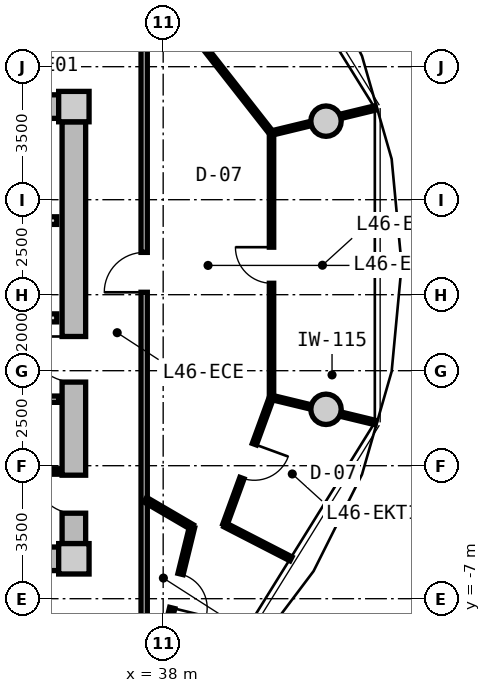
"""IFC4 building model, lengths in metres.
Left out: names, types, materials, properties, quantities, classifications, styles, units other than length and angle.
Written with IfcOpenShell. Run it as: python <this file> out.ifc"""

import sys

from ifc_helpers import new_model, si_unit, direction, frame, frame_2d, origin, origin_2d, place, context, subcontext, project, spatial, rectangle, circle, extrude, source, transform, mapped, element, fill, save


model = new_model("IFC4")
c1 = context("Model", 3, precision=1e-05, world=origin(), true_north=direction((0.0, 1.0)))
c2 = subcontext(c1, "Body", "Model", "MODEL_VIEW")
j1 = project(units=[si_unit("LENGTHUNIT", "METRE"), si_unit("PLANEANGLEUNIT", "RADIAN")], contexts=[c1])
p1 = place(None, origin())
s1 = spatial("IfcSite", under=j1, at=p1, CompositionType="ELEMENT")
p2 = place(p1, origin())
s2 = spatial("IfcBuilding", under=s1, at=p2, CompositionType="ELEMENT")
p3 = place(p2, frame((0.0, 0.0, 149.55)))
s3 = spatial("IfcBuildingStorey", under=s2, at=p3, CompositionType="ELEMENT", Elevation=149.55)
m1 = source(origin(), c2, "Body", "SweptSolid", [
    extrude(rectangle(XDim=0.8, YDim=0.8, at=origin_2d()), origin(), (0.0, 0.0, 1.0), 3.05),
])
for number, where, z_axis, x_axis in (
    (1, (35.65, -5.95, 0.0), (0.0, 0.0, 1.0), (1.0, 0.0, 0.0)),
    (2, (35.65, 5.95, 0.0), (0.0, 0.0, 1.0), (1.0, 0.0, 0.0)),
):
    element("IfcColumn", number, at=place(p3, frame(where, z_axis=z_axis, x_axis=x_axis)), inside=s3, PredefinedType="COLUMN", context=c2, shape_type="MappedRepresentation", body=[
        mapped(m1, transform((0.0, 0.0, 0.0), x_axis=(1.0, 0.0, 0.0), y_axis=(0.0, 1.0, 0.0), z_axis=(0.0, 0.0, 1.0), scale=1.0)),
    ])
m2 = source(origin(), c2, "Body", "SweptSolid", [
    extrude(rectangle(XDim=14.5, YDim=0.62, at=frame_2d((7.25, 0.0))), origin(), (0.0, 0.0, 1.0), 2.81),
])
for number, where, z_axis, x_axis in (
    (3, (20.75, 5.95, 0.0), (0.0, 0.0, 1.0), (1.0, 0.0, 0.0)),
    (4, (35.25, -5.95, 0.0), (0.0, 0.0, 1.0), (-1.0, 0.0, 0.0)),
):
    element("IfcWall", number, at=place(p3, frame(where, z_axis=z_axis, x_axis=x_axis)), inside=s3, PredefinedType="SHEAR", context=c2, shape_type="MappedRepresentation", body=[
        mapped(m2, transform((0.0, 0.0, 0.0), x_axis=(1.0, 0.0, 0.0), y_axis=(0.0, 1.0, 0.0), z_axis=(0.0, 0.0, 1.0), scale=1.0)),
    ])
m3 = source(origin(), c2, "Body", "SweptSolid", [
    extrude(rectangle(XDim=11.1, YDim=0.62, at=frame_2d((5.55, 0.0))), origin(), (0.0, 0.0, 1.0), 2.81),
])
p4 = place(p3, frame((35.65, 5.55, 0.0), z_axis=(0.0, 0.0, 1.0), x_axis=(0.0, -1.0, 0.0)))
e5 = element("IfcWall", 5, at=p4, inside=s3, PredefinedType="SHEAR", context=c2, shape_type="MappedRepresentation", body=[
    mapped(m3, transform((0.0, 0.0, 0.0), x_axis=(1.0, 0.0, 0.0), y_axis=(0.0, 1.0, 0.0), z_axis=(0.0, 0.0, 1.0), scale=1.0)),
])
p5 = place(p4, frame((5.65, 0.0, 0.0)))
e6 = element("IfcOpeningElement", 6, at=p5, cuts=e5, PredefinedType="OPENING", context=c2, shape_type="SweptSolid", body=[
    extrude(rectangle(XDim=1.2, YDim=2.15, at=frame_2d((0.6, 1.075))), frame((0.0, 0.32, 0.0), z_axis=(0.0, -1.0, 0.0), x_axis=(1.0, 0.0, 0.0)), (0.0, 0.0, 1.0), 0.64),
])
p6 = place(p4, frame((9.3, 0.0, 0.0)))
e7 = element("IfcOpeningElement", 7, at=p6, cuts=e5, PredefinedType="OPENING", context=c2, shape_type="SweptSolid", body=[
    extrude(rectangle(XDim=1.0, YDim=2.1, at=frame_2d((0.5, 1.05))), frame((0.0, 0.32, 0.0), z_axis=(0.0, -1.0, 0.0), x_axis=(1.0, 0.0, 0.0)), (0.0, 0.0, 1.0), 0.64),
])
m4 = source(origin(), c2, "Body", "SweptSolid", [
    extrude(circle(Radius=0.4, at=origin_2d()), origin(), (0.0, 0.0, 1.0), 3.05),
])
for number, where, z_axis, x_axis in (
    (8, (42.285, 5.567, 0.0), (0.0, 0.0, 1.0), (1.0, 0.0, 0.0)),
    (9, (42.285, -2.016, 0.0), (0.0, 0.0, 1.0), (1.0, 0.0, 0.0)),
):
    element("IfcColumn", number, at=place(p3, frame(where, z_axis=z_axis, x_axis=x_axis)), inside=s3, PredefinedType="COLUMN", context=c2, shape_type="MappedRepresentation", body=[
        mapped(m4, transform((0.0, 0.0, 0.0), x_axis=(1.0, 0.0, 0.0), y_axis=(0.0, 1.0, 0.0), z_axis=(0.0, 0.0, 1.0), scale=1.0)),
    ])
m5 = source(origin(), c2, "Body", "SweptSolid", [
    extrude(rectangle(XDim=3.2, YDim=0.2, at=frame_2d((1.6, 0.0))), origin(), (0.0, 0.0, 1.0), 2.795),
])
p7 = place(p3, frame((32.0, 2.95, 0.0), z_axis=(0.0, 0.0, 1.0), x_axis=(1.0, 0.0, 0.0)))
e10 = element("IfcWall", 10, at=p7, inside=s3, PredefinedType="PARTITIONING", context=c2, shape_type="MappedRepresentation", body=[
    mapped(m5, transform((0.0, 0.0, 0.0), x_axis=(1.0, 0.0, 0.0), y_axis=(0.0, 1.0, 0.0), z_axis=(0.0, 0.0, 1.0), scale=1.0)),
])
m6 = source(origin(), c2, "Body", "SweptSolid", [
    extrude(rectangle(XDim=6.66, YDim=0.21, at=frame_2d((3.33, 0.0))), origin(), (0.0, 0.0, 1.0), 2.795),
])
p8 = place(p3, frame((28.54, 0.39, 0.0), z_axis=(0.0, 0.0, 1.0), x_axis=(1.0, 0.0, 0.0)))
e11 = element("IfcWall", 11, at=p8, inside=s3, PredefinedType="PARTITIONING", context=c2, shape_type="MappedRepresentation", body=[
    mapped(m6, transform((0.0, 0.0, 0.0), x_axis=(1.0, 0.0, 0.0), y_axis=(0.0, 1.0, 0.0), z_axis=(0.0, 0.0, 1.0), scale=1.0)),
])
p9 = place(p8, frame((1.0, 0.0, 0.0)))
e12 = element("IfcOpeningElement", 12, at=p9, cuts=e11, PredefinedType="OPENING", context=c2, shape_type="SweptSolid", body=[
    extrude(rectangle(XDim=1.2, YDim=2.15, at=frame_2d((0.6, 1.075))), frame((0.0, 0.115, 0.0), z_axis=(0.0, -1.0, 0.0), x_axis=(1.0, 0.0, 0.0)), (0.0, 0.0, 1.0), 0.23),
])
m7 = source(origin(), c2, "Body", "SweptSolid", [
    extrude(rectangle(XDim=2.7, YDim=0.165, at=frame_2d((1.35, 0.0))), origin(), (0.0, 0.0, 1.0), 2.795),
])
p10 = place(p3, frame((32.55, -1.75, 0.0), z_axis=(0.0, 0.0, 1.0), x_axis=(1.0, 0.0, 0.0)))
e13 = element("IfcWall", 13, at=p10, inside=s3, PredefinedType="PARTITIONING", context=c2, shape_type="MappedRepresentation", body=[
    mapped(m7, transform((0.0, 0.0, 0.0), x_axis=(1.0, 0.0, 0.0), y_axis=(0.0, 1.0, 0.0), z_axis=(0.0, 0.0, 1.0), scale=1.0)),
])
p11 = place(p10, frame((0.85, 0.0, 0.0)))
e14 = element("IfcOpeningElement", 14, at=p11, cuts=e13, PredefinedType="OPENING", context=c2, shape_type="SweptSolid", body=[
    extrude(rectangle(XDim=0.925, YDim=2.1, at=frame_2d((0.462, 1.05))), frame((0.0, 0.093, 0.0), z_axis=(0.0, -1.0, 0.0), x_axis=(1.0, 0.0, 0.0)), (0.0, 0.0, 1.0), 0.185),
])
m8 = source(origin(), c2, "Body", "SweptSolid", [
    extrude(rectangle(XDim=2.7, YDim=0.14, at=frame_2d((1.35, 0.0))), origin(), (0.0, 0.0, 1.0), 2.795),
])
p12 = place(p3, frame((32.55, -3.65, 0.0), z_axis=(0.0, 0.0, 1.0), x_axis=(1.0, 0.0, 0.0)))
e15 = element("IfcWall", 15, at=p12, inside=s3, PredefinedType="PARTITIONING", context=c2, shape_type="MappedRepresentation", body=[
    mapped(m8, transform((0.0, 0.0, 0.0), x_axis=(1.0, 0.0, 0.0), y_axis=(0.0, 1.0, 0.0), z_axis=(0.0, 0.0, 1.0), scale=1.0)),
])
m9 = source(origin(), c2, "Body", "SweptSolid", [
    extrude(rectangle(XDim=15.6, YDim=0.165, at=frame_2d((7.8, 0.0))), origin(), (0.0, 0.0, 1.0), 2.795),
])
p13 = place(p3, frame((37.5, 7.8, 0.0), z_axis=(0.0, 0.0, 1.0), x_axis=(0.0, -1.0, 0.0)))
e16 = element("IfcWall", 16, at=p13, inside=s3, PredefinedType="PARTITIONING", context=c2, shape_type="MappedRepresentation", body=[
    mapped(m9, transform((0.0, 0.0, 0.0), x_axis=(1.0, 0.0, 0.0), y_axis=(0.0, 1.0, 0.0), z_axis=(0.0, 0.0, 1.0), scale=1.0)),
])
p14 = place(p13, frame((5.687, 0.0, 0.0)))
e17 = element("IfcOpeningElement", 17, at=p14, cuts=e16, PredefinedType="OPENING", context=c2, shape_type="SweptSolid", body=[
    extrude(rectangle(XDim=1.05, YDim=2.15, at=frame_2d((0.525, 1.075))), frame((0.0, 0.093, 0.0), z_axis=(0.0, -1.0, 0.0), x_axis=(1.0, 0.0, 0.0)), (0.0, 0.0, 1.0), 0.185),
])
m10 = source(origin(), c2, "Body", "SweptSolid", [
    extrude(rectangle(XDim=6.958, YDim=0.115, at=frame_2d((3.479, 0.0))), origin(), (0.0, 0.0, 1.0), 2.795),
])
p15 = place(p3, frame((40.851, -1.703, 0.0), z_axis=(0.0, 0.0, 1.0), x_axis=(0.0, 1.0, 0.0)))
e18 = element("IfcWall", 18, at=p15, inside=s3, PredefinedType="PARTITIONING", context=c2, shape_type="MappedRepresentation", body=[
    mapped(m10, transform((0.0, 0.0, 0.0), x_axis=(1.0, 0.0, 0.0), y_axis=(0.0, 1.0, 0.0), z_axis=(0.0, 0.0, 1.0), scale=1.0)),
])
p16 = place(p15, frame((3.004, 0.0, 0.0)))
e19 = element("IfcOpeningElement", 19, at=p16, cuts=e18, PredefinedType="OPENING", context=c2, shape_type="SweptSolid", body=[
    extrude(rectangle(XDim=0.95, YDim=2.1, at=frame_2d((0.475, 1.05))), frame((0.0, 0.067, 0.0), z_axis=(0.0, -1.0, 0.0), x_axis=(1.0, 0.0, 0.0)), (0.0, 0.0, 1.0), 0.135),
])
m11 = source(origin(), c2, "Body", "SweptSolid", [
    extrude(rectangle(XDim=2.817, YDim=0.115, at=frame_2d((1.408, 0.0))), origin(), (0.0, 0.0, 1.0), 2.345),
])
p17 = place(p3, frame((40.851, -1.703, 0.0), z_axis=(0.0, 0.0, 1.0), x_axis=(0.971960052091, -0.235146033647, 0.0)))
e20 = element("IfcWall", 20, at=p17, inside=s3, PredefinedType="PARTITIONING", context=c2, shape_type="MappedRepresentation", body=[
    mapped(m11, transform((0.0, 0.0, 0.0), x_axis=(1.0, 0.0, 0.0), y_axis=(0.0, 1.0, 0.0), z_axis=(0.0, 0.0, 1.0), scale=1.0)),
])
m12 = source(origin(), c2, "Body", "SweptSolid", [
    extrude(rectangle(XDim=6.966, YDim=0.115, at=frame_2d((3.483, 0.0))), origin(), (0.0, 0.0, 1.0), 2.795),
])
p18 = place(p3, frame((40.85, 5.254, 0.0), z_axis=(0.0, 0.0, 1.0), x_axis=(-0.616695640563, 0.787201681217, 0.0)))
e21 = element("IfcWall", 21, at=p18, inside=s3, PredefinedType="PARTITIONING", context=c2, shape_type="MappedRepresentation", body=[
    mapped(m12, transform((0.0, 0.0, 0.0), x_axis=(1.0, 0.0, 0.0), y_axis=(0.0, 1.0, 0.0), z_axis=(0.0, 0.0, 1.0), scale=1.0)),
])
p19 = place(p18, frame((3.008, 0.0, 0.0)))
e22 = element("IfcOpeningElement", 22, at=p19, cuts=e21, PredefinedType="OPENING", context=c2, shape_type="SweptSolid", body=[
    extrude(rectangle(XDim=0.95, YDim=2.1, at=frame_2d((0.475, 1.05))), frame((0.0, 0.067, 0.0), z_axis=(0.0, -1.0, 0.0), x_axis=(1.0, 0.0, 0.0)), (0.0, 0.0, 1.0), 0.135),
])
m13 = source(origin(), c2, "Body", "SweptSolid", [
    extrude(rectangle(XDim=2.818, YDim=0.115, at=frame_2d((1.409, 0.0))), origin(), (0.0, 0.0, 1.0), 2.345),
])
p20 = place(p3, frame((40.85, 5.254, 0.0), z_axis=(0.0, 0.0, 1.0), x_axis=(0.971949193017, 0.235190914353, 0.0)))
e23 = element("IfcWall", 23, at=p20, inside=s3, PredefinedType="PARTITIONING", context=c2, shape_type="MappedRepresentation", body=[
    mapped(m13, transform((0.0, 0.0, 0.0), x_axis=(1.0, 0.0, 0.0), y_axis=(0.0, 1.0, 0.0), z_axis=(0.0, 0.0, 1.0), scale=1.0)),
])
m14 = source(origin(), c2, "Body", "SweptSolid", [
    extrude(rectangle(XDim=1.425, YDim=0.14, at=frame_2d((0.712, 0.0))), origin(), (0.0, 0.0, 1.0), 2.795),
])
p21 = place(p3, frame((37.53, -4.396, 0.0), z_axis=(0.0, 0.0, 1.0), x_axis=(0.86324395577, -0.50478695786, 0.0)))
e24 = element("IfcWall", 24, at=p21, inside=s3, PredefinedType="PARTITIONING", context=c2, shape_type="MappedRepresentation", body=[
    mapped(m14, transform((0.0, 0.0, 0.0), x_axis=(1.0, 0.0, 0.0), y_axis=(0.0, 1.0, 0.0), z_axis=(0.0, 0.0, 1.0), scale=1.0)),
])
m15 = source(origin(), c2, "Body", "SweptSolid", [
    extrude(rectangle(XDim=3.464, YDim=0.14, at=frame_2d((1.732, 0.0))), origin(), (0.0, 0.0, 1.0), 2.795),
])
p22 = place(p3, frame((38.76, -5.115, 0.0), z_axis=(0.0, 0.0, 1.0), x_axis=(-0.238055968485, -0.971251438027, 0.0)))
e25 = element("IfcWall", 25, at=p22, inside=s3, PredefinedType="PARTITIONING", context=c2, shape_type="MappedRepresentation", body=[
    mapped(m15, transform((0.0, 0.0, 0.0), x_axis=(1.0, 0.0, 0.0), y_axis=(0.0, 1.0, 0.0), z_axis=(0.0, 0.0, 1.0), scale=1.0)),
])
p23 = place(p22, frame((1.272, 0.0, 0.0)))
e26 = element("IfcOpeningElement", 26, at=p23, cuts=e25, PredefinedType="OPENING", context=c2, shape_type="SweptSolid", body=[
    extrude(rectangle(XDim=0.92, YDim=2.1, at=frame_2d((0.46, 1.05))), frame((0.0, 0.08, 0.0), z_axis=(0.0, -1.0, 0.0), x_axis=(1.0, 0.0, 0.0)), (0.0, 0.0, 1.0), 0.16),
])
m16 = source(origin(), c2, "Body", "SweptSolid", [
    extrude(rectangle(XDim=1.957, YDim=0.115, at=frame_2d((0.979, 0.0))), origin(), (0.0, 0.0, 1.0), 2.795),
])
p24 = place(p3, frame((39.623, -5.057, 0.0), z_axis=(0.0, 0.0, 1.0), x_axis=(0.889228358674, -0.45746357902, 0.0)))
e27 = element("IfcWall", 27, at=p24, inside=s3, PredefinedType="PARTITIONING", context=c2, shape_type="MappedRepresentation", body=[
    mapped(m16, transform((0.0, 0.0, 0.0), x_axis=(1.0, 0.0, 0.0), y_axis=(0.0, 1.0, 0.0), z_axis=(0.0, 0.0, 1.0), scale=1.0)),
])
m17 = source(origin(), c2, "Body", "SweptSolid", [
    extrude(rectangle(XDim=3.571, YDim=0.115, at=frame_2d((1.786, 0.0))), origin(), (0.0, 0.0, 1.0), 2.795),
])
p25 = place(p3, frame((39.623, -5.057, 0.0), z_axis=(0.0, 0.0, 1.0), x_axis=(0.343515356993, 0.939147059576, 0.0)))
e28 = element("IfcWall", 28, at=p25, inside=s3, PredefinedType="PARTITIONING", context=c2, shape_type="MappedRepresentation", body=[
    mapped(m17, transform((0.0, 0.0, 0.0), x_axis=(1.0, 0.0, 0.0), y_axis=(0.0, 1.0, 0.0), z_axis=(0.0, 0.0, 1.0), scale=1.0)),
])
p26 = place(p25, frame((1.311, 0.0, 0.0)))
e29 = element("IfcOpeningElement", 29, at=p26, cuts=e28, PredefinedType="OPENING", context=c2, shape_type="SweptSolid", body=[
    extrude(rectangle(XDim=0.95, YDim=2.1, at=frame_2d((0.475, 1.05))), frame((0.0, 0.067, 0.0), z_axis=(0.0, -1.0, 0.0), x_axis=(1.0, 0.0, 0.0)), (0.0, 0.0, 1.0), 0.135),
])
m18 = source(origin(), c2, "Body", "SweptSolid", [
    extrude(rectangle(XDim=1.2, YDim=2.15, at=frame_2d((0.6, 1.075))), frame((0.0, 0.025, 0.0), z_axis=(0.0, -1.0, 0.0), x_axis=(1.0, 0.0, 0.0)), (0.0, 0.0, 1.0), 0.05),
])
p27 = place(p5, frame((1.2, 0.0, 0.0), z_axis=(0.0, 0.0, 1.0), x_axis=(-1.0, 0.0, 0.0)))
e30 = element("IfcDoor", 30, at=p27, inside=s3, OperationType="SINGLE_SWING_RIGHT", PredefinedType="DOOR", context=c2, shape_type="MappedRepresentation", body=[
    mapped(m18, transform((0.0, 0.0, 0.0), x_axis=(1.0, 0.0, 0.0), y_axis=(0.0, 1.0, 0.0), z_axis=(0.0, 0.0, 1.0), scale=1.0)),
])
fill(e6, e30)
m19 = source(origin(), c2, "Body", "SweptSolid", [
    extrude(rectangle(XDim=1.0, YDim=2.1, at=frame_2d((0.5, 1.05))), frame((0.0, 0.025, 0.0), z_axis=(0.0, -1.0, 0.0), x_axis=(1.0, 0.0, 0.0)), (0.0, 0.0, 1.0), 0.05),
])
p28 = place(p6, frame((1.0, 0.0, 0.0), z_axis=(0.0, 0.0, 1.0), x_axis=(-1.0, 0.0, 0.0)))
e31 = element("IfcDoor", 31, at=p28, inside=s3, OperationType="SINGLE_SWING_RIGHT", PredefinedType="DOOR", context=c2, shape_type="MappedRepresentation", body=[
    mapped(m19, transform((0.0, 0.0, 0.0), x_axis=(1.0, 0.0, 0.0), y_axis=(0.0, 1.0, 0.0), z_axis=(0.0, 0.0, 1.0), scale=1.0)),
])
fill(e7, e31)
m20 = source(origin(), c2, "Body", "SweptSolid", [
    extrude(rectangle(XDim=1.05, YDim=2.15, at=frame_2d((0.525, 1.075))), frame((0.0, 0.025, 0.0), z_axis=(0.0, -1.0, 0.0), x_axis=(1.0, 0.0, 0.0)), (0.0, 0.0, 1.0), 0.05),
])
p29 = place(p14, frame((1.05, 0.0, 0.0), z_axis=(0.0, 0.0, 1.0), x_axis=(-1.0, 0.0, 0.0)))
e32 = element("IfcDoor", 32, at=p29, inside=s3, OperationType="SINGLE_SWING_LEFT", PredefinedType="DOOR", context=c2, shape_type="MappedRepresentation", body=[
    mapped(m20, transform((0.0, 0.0, 0.0), x_axis=(1.0, 0.0, 0.0), y_axis=(0.0, 1.0, 0.0), z_axis=(0.0, 0.0, 1.0), scale=1.0)),
])
fill(e17, e32)
m21 = source(origin(), c2, "Body", "SweptSolid", [
    extrude(rectangle(XDim=0.92, YDim=2.1, at=frame_2d((0.46, 1.05))), frame((0.0, 0.025, 0.0), z_axis=(0.0, -1.0, 0.0), x_axis=(1.0, 0.0, 0.0)), (0.0, 0.0, 1.0), 0.05),
])
p30 = place(p23, origin())
e33 = element("IfcDoor", 33, at=p30, inside=s3, OperationType="SINGLE_SWING_RIGHT", PredefinedType="DOOR", context=c2, shape_type="MappedRepresentation", body=[
    mapped(m21, transform((0.0, 0.0, 0.0), x_axis=(1.0, 0.0, 0.0), y_axis=(0.0, 1.0, 0.0), z_axis=(0.0, 0.0, 1.0), scale=1.0)),
])
fill(e26, e33)
m22 = source(origin(), c2, "Body", "SweptSolid", [
    extrude(rectangle(XDim=0.95, YDim=2.1, at=frame_2d((0.475, 1.05))), frame((0.0, 0.025, 0.0), z_axis=(0.0, -1.0, 0.0), x_axis=(1.0, 0.0, 0.0)), (0.0, 0.0, 1.0), 0.05),
])
p31 = place(p26, frame((0.95, 0.0, 0.0), z_axis=(0.0, 0.0, 1.0), x_axis=(-1.0, 0.0, 0.0)))
e34 = element("IfcDoor", 34, at=p31, inside=s3, OperationType="SINGLE_SWING_LEFT", PredefinedType="DOOR", context=c2, shape_type="MappedRepresentation", body=[
    mapped(m22, transform((0.0, 0.0, 0.0), x_axis=(1.0, 0.0, 0.0), y_axis=(0.0, 1.0, 0.0), z_axis=(0.0, 0.0, 1.0), scale=1.0)),
])
fill(e29, e34)
p32 = place(p16, origin())
e35 = element("IfcDoor", 35, at=p32, inside=s3, OperationType="SINGLE_SWING_RIGHT", PredefinedType="DOOR", context=c2, shape_type="MappedRepresentation", body=[
    mapped(m22, transform((0.0, 0.0, 0.0), x_axis=(1.0, 0.0, 0.0), y_axis=(0.0, 1.0, 0.0), z_axis=(0.0, 0.0, 1.0), scale=1.0)),
])
fill(e19, e35)
save(model, sys.argv[1])
